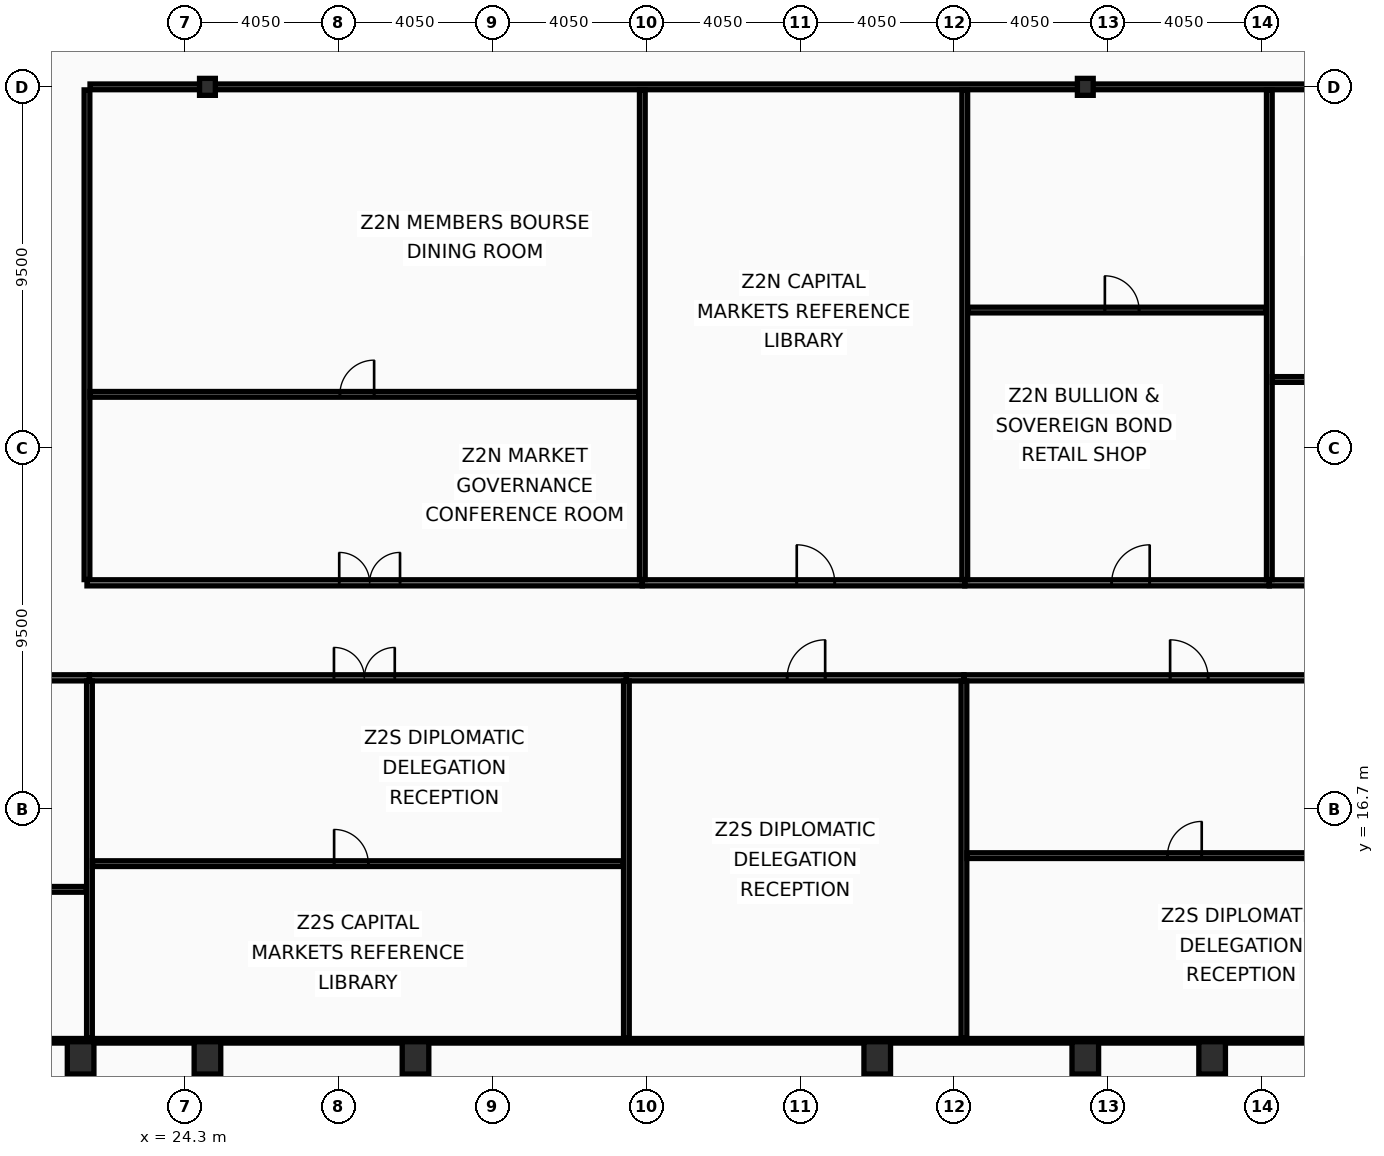
"""IFC4 building model, lengths in metres.
Left out: names, types, materials, properties, quantities, classifications, styles, units other than length and angle.
Written with IfcOpenShell. Run it as: python <this file> out.ifc"""

import sys

from ifc_helpers import new_model, si_unit, direction, frame, frame_2d, origin, origin_2d, place, context, subcontext, project, spatial, rectangle, hollow_rectangle, i_section, extrude, element, fill, save


model = new_model("IFC4")
c1 = context("Model", 3, precision=1e-05, world=origin(), true_north=direction((0.0, 1.0)))
c2 = subcontext(c1, "Body", "Model", "MODEL_VIEW")
j1 = project(units=[si_unit("LENGTHUNIT", "METRE"), si_unit("PLANEANGLEUNIT", "RADIAN")], contexts=[c1])
p1 = place(None, origin())
s1 = spatial("IfcSite", under=j1, at=p1, CompositionType="ELEMENT")
p2 = place(p1, origin())
s2 = spatial("IfcBuilding", under=s1, at=p2, CompositionType="ELEMENT")
p3 = place(p2, frame((0.0, 0.0, 121.8)))
s3 = spatial("IfcBuildingStorey", under=s2, at=p3, CompositionType="ELEMENT", Elevation=121.8)
for number, where, z_axis, x_axis in (
    (1, (21.562, 10.15, 0.0), (0.0, 0.0, 1.0), (1.0, 0.0, 0.0)),
    (2, (24.9, 10.15, 0.0), (0.0, 0.0, 1.0), (1.0, 0.0, 0.0)),
    (3, (30.375, 10.15, 0.0), (0.0, 0.0, 1.0), (1.0, 0.0, 0.0)),
    (4, (42.525, 10.15, 0.0), (0.0, 0.0, 1.0), (1.0, 0.0, 0.0)),
    (5, (48.0, 10.15, 0.0), (0.0, 0.0, 1.0), (1.0, 0.0, 0.0)),
    (6, (51.337, 10.15, 0.0), (0.0, 0.0, 1.0), (1.0, 0.0, 0.0)),
):
    element("IfcColumn", number, at=place(p3, frame(where, z_axis=z_axis, x_axis=x_axis)), inside=s3, PredefinedType="COLUMN", context=c2, shape_type="SweptSolid", body=[
        extrude(hollow_rectangle(XDim=0.7, YDim=0.85, WallThickness=0.05, at=origin_2d()), origin(), (0.0, 0.0, 1.0), 3.6),
    ])
for number, where, z_axis, x_axis in (
    (7, (24.9, 35.7, 0.0), (0.0, 0.0, 1.0), (1.0, 0.0, 0.0)),
    (8, (48.0, 35.7, 0.0), (0.0, 0.0, 1.0), (1.0, 0.0, 0.0)),
):
    element("IfcColumn", number, at=place(p3, frame(where, z_axis=z_axis, x_axis=x_axis)), inside=s3, PredefinedType="COLUMN", context=c2, shape_type="SweptSolid", body=[
        extrude(i_section(OverallWidth=0.416, OverallDepth=0.446, WebThickness=0.039, FlangeThickness=0.063, at=origin_2d()), origin(), (0.0, 0.0, 1.0), 3.6),
    ])
p4 = place(p3, frame((4.03, 20.15, 0.0), z_axis=(0.0, 0.0, 1.0), x_axis=(1.0, 0.0, 0.0)))
e9 = element("IfcWall", 9, at=p4, inside=s3, PredefinedType="PARTITIONING", context=c2, shape_type="SweptSolid", body=[
    extrude(rectangle(XDim=17.765, YDim=0.16, at=frame_2d((8.883, 0.0))), origin(), (0.0, 0.0, 1.0), 2.73),
])
p5 = place(p4, frame((7.961, 0.0, 0.0)))
e10 = element("IfcOpeningElement", 10, at=p5, cuts=e9, PredefinedType="OPENING", context=c2, shape_type="SweptSolid", body=[
    extrude(rectangle(XDim=1.6, YDim=2.15, at=frame_2d((0.8, 1.075))), frame((0.0, 0.09, 0.0), z_axis=(0.0, -1.0, 0.0), x_axis=(1.0, 0.0, 0.0)), (0.0, 0.0, 1.0), 0.18),
])
p6 = place(p3, frame((4.095, 14.584, 0.0), z_axis=(0.0, 0.0, 1.0), x_axis=(1.0, 0.0, 0.0)))
e11 = element("IfcWall", 11, at=p6, inside=s3, PredefinedType="PARTITIONING", context=c2, shape_type="SweptSolid", body=[
    extrude(rectangle(XDim=17.62, YDim=0.15, at=frame_2d((8.81, 0.0))), origin(), (0.0, 0.0, 1.0), 2.73),
])
p7 = place(p6, frame((7.994, 0.0, 0.0)))
e12 = element("IfcOpeningElement", 12, at=p7, cuts=e11, PredefinedType="OPENING", context=c2, shape_type="SweptSolid", body=[
    extrude(rectangle(XDim=0.9, YDim=2.05, at=frame_2d((0.45, 1.025))), frame((0.0, 0.085, 0.0), z_axis=(0.0, -1.0, 0.0), x_axis=(1.0, 0.0, 0.0)), (0.0, 0.0, 1.0), 0.17),
])
p8 = place(p3, frame((21.795, 20.15, 0.0), z_axis=(0.0, 0.0, 1.0), x_axis=(1.0, 0.0, 0.0)))
e13 = element("IfcWall", 13, at=p8, inside=s3, PredefinedType="PARTITIONING", context=c2, shape_type="SweptSolid", body=[
    extrude(rectangle(XDim=14.129, YDim=0.16, at=frame_2d((7.064, 0.0))), origin(), (0.0, 0.0, 1.0), 2.73),
])
p9 = place(p8, frame((6.434, 0.0, 0.0)))
e14 = element("IfcOpeningElement", 14, at=p9, cuts=e13, PredefinedType="OPENING", context=c2, shape_type="SweptSolid", body=[
    extrude(rectangle(XDim=1.6, YDim=2.15, at=frame_2d((0.8, 1.075))), frame((0.0, 0.09, 0.0), z_axis=(0.0, -1.0, 0.0), x_axis=(1.0, 0.0, 0.0)), (0.0, 0.0, 1.0), 0.18),
])
p10 = place(p3, frame((21.795, 10.665, 0.0), z_axis=(0.0, 0.0, 1.0), x_axis=(0.0, 1.0, 0.0)))
e15 = element("IfcWall", 15, at=p10, inside=s3, PredefinedType="PARTITIONING", context=c2, shape_type="SweptSolid", body=[
    extrude(rectangle(XDim=9.4, YDim=0.15, at=frame_2d((4.7, 0.0))), origin(), (0.0, 0.0, 1.0), 2.88),
])
p11 = place(p3, frame((21.875, 15.261, 0.0), z_axis=(0.0, 0.0, 1.0), x_axis=(1.0, 0.0, 0.0)))
e16 = element("IfcWall", 16, at=p11, inside=s3, PredefinedType="PARTITIONING", context=c2, shape_type="SweptSolid", body=[
    extrude(rectangle(XDim=13.969, YDim=0.15, at=frame_2d((6.984, 0.0))), origin(), (0.0, 0.0, 1.0), 2.73),
])
p12 = place(p11, frame((6.358, 0.0, 0.0)))
e17 = element("IfcOpeningElement", 17, at=p12, cuts=e16, PredefinedType="OPENING", context=c2, shape_type="SweptSolid", body=[
    extrude(rectangle(XDim=0.9, YDim=2.05, at=frame_2d((0.45, 1.025))), frame((0.0, 0.085, 0.0), z_axis=(0.0, -1.0, 0.0), x_axis=(1.0, 0.0, 0.0)), (0.0, 0.0, 1.0), 0.17),
])
p13 = place(p3, frame((35.924, 20.15, 0.0), z_axis=(0.0, 0.0, 1.0), x_axis=(1.0, 0.0, 0.0)))
e18 = element("IfcWall", 18, at=p13, inside=s3, PredefinedType="PARTITIONING", context=c2, shape_type="SweptSolid", body=[
    extrude(rectangle(XDim=8.883, YDim=0.16, at=frame_2d((4.441, 0.0))), origin(), (0.0, 0.0, 1.0), 2.73),
])
p14 = place(p13, frame((4.231, 0.0, 0.0)))
e19 = element("IfcOpeningElement", 19, at=p14, cuts=e18, PredefinedType="OPENING", context=c2, shape_type="SweptSolid", body=[
    extrude(rectangle(XDim=1.0, YDim=2.05, at=frame_2d((0.5, 1.025))), frame((0.0, 0.09, 0.0), z_axis=(0.0, -1.0, 0.0), x_axis=(1.0, 0.0, 0.0)), (0.0, 0.0, 1.0), 0.18),
])
p15 = place(p3, frame((35.924, 10.665, 0.0), z_axis=(0.0, 0.0, 1.0), x_axis=(0.0, 1.0, 0.0)))
e20 = element("IfcWall", 20, at=p15, inside=s3, PredefinedType="PARTITIONING", context=c2, shape_type="SweptSolid", body=[
    extrude(rectangle(XDim=9.4, YDim=0.15, at=frame_2d((4.7, 0.0))), origin(), (0.0, 0.0, 1.0), 2.88),
])
p16 = place(p3, frame((44.807, 20.15, 0.0), z_axis=(0.0, 0.0, 1.0), x_axis=(1.0, 0.0, 0.0)))
e21 = element("IfcWall", 21, at=p16, inside=s3, PredefinedType="PARTITIONING", context=c2, shape_type="SweptSolid", body=[
    extrude(rectangle(XDim=11.727, YDim=0.16, at=frame_2d((5.863, 0.0))), origin(), (0.0, 0.0, 1.0), 2.73),
])
p17 = place(p16, frame((5.425, 0.0, 0.0)))
e22 = element("IfcOpeningElement", 22, at=p17, cuts=e21, PredefinedType="OPENING", context=c2, shape_type="SweptSolid", body=[
    extrude(rectangle(XDim=1.0, YDim=2.05, at=frame_2d((0.5, 1.025))), frame((0.0, 0.09, 0.0), z_axis=(0.0, -1.0, 0.0), x_axis=(1.0, 0.0, 0.0)), (0.0, 0.0, 1.0), 0.18),
])
p18 = place(p3, frame((44.807, 10.665, 0.0), z_axis=(0.0, 0.0, 1.0), x_axis=(0.0, 1.0, 0.0)))
e23 = element("IfcWall", 23, at=p18, inside=s3, PredefinedType="PARTITIONING", context=c2, shape_type="SweptSolid", body=[
    extrude(rectangle(XDim=9.4, YDim=0.15, at=frame_2d((4.7, 0.0))), origin(), (0.0, 0.0, 1.0), 2.88),
])
p19 = place(p3, frame((44.887, 15.472, 0.0), z_axis=(0.0, 0.0, 1.0), x_axis=(1.0, 0.0, 0.0)))
e24 = element("IfcWall", 24, at=p19, inside=s3, PredefinedType="PARTITIONING", context=c2, shape_type="SweptSolid", body=[
    extrude(rectangle(XDim=11.566, YDim=0.15, at=frame_2d((5.783, 0.0))), origin(), (0.0, 0.0, 1.0), 2.73),
])
p20 = place(p19, frame((5.277, 0.0, 0.0)))
e25 = element("IfcOpeningElement", 25, at=p20, cuts=e24, PredefinedType="OPENING", context=c2, shape_type="SweptSolid", body=[
    extrude(rectangle(XDim=0.9, YDim=2.05, at=frame_2d((0.45, 1.025))), frame((0.0, 0.085, 0.0), z_axis=(0.0, -1.0, 0.0), x_axis=(1.0, 0.0, 0.0)), (0.0, 0.0, 1.0), 0.17),
])
p21 = place(p3, frame((21.73, 22.735, 0.0), z_axis=(0.0, 0.0, 1.0), x_axis=(0.0, 1.0, 0.0)))
e26 = element("IfcWall", 26, at=p21, inside=s3, PredefinedType="PARTITIONING", context=c2, shape_type="SweptSolid", body=[
    extrude(rectangle(XDim=12.885, YDim=0.15, at=frame_2d((6.442, 0.0))), origin(), (0.0, 0.0, 1.0), 2.88),
])
p22 = place(p3, frame((21.81, 35.7, 0.0), z_axis=(0.0, 0.0, 1.0), x_axis=(1.0, 0.0, 0.0)))
e27 = element("IfcWall", 27, at=p22, inside=s3, PredefinedType="PARTITIONING", context=c2, shape_type="SweptSolid", body=[
    extrude(rectangle(XDim=46.995, YDim=0.15, at=frame_2d((23.498, 0.0))), origin(), (0.0, 0.0, 1.0), 2.73),
])
p23 = place(p3, frame((21.73, 22.65, 0.0), z_axis=(0.0, 0.0, 1.0), x_axis=(1.0, 0.0, 0.0)))
e28 = element("IfcWall", 28, at=p23, inside=s3, PredefinedType="PARTITIONING", context=c2, shape_type="SweptSolid", body=[
    extrude(rectangle(XDim=14.614, YDim=0.16, at=frame_2d((7.307, 0.0))), origin(), (0.0, 0.0, 1.0), 2.73),
])
p24 = place(p23, frame((6.638, 0.0, 0.0)))
e29 = element("IfcOpeningElement", 29, at=p24, cuts=e28, PredefinedType="OPENING", context=c2, shape_type="SweptSolid", body=[
    extrude(rectangle(XDim=1.6, YDim=2.15, at=frame_2d((0.8, 1.075))), frame((0.0, 0.09, 0.0), z_axis=(0.0, -1.0, 0.0), x_axis=(1.0, 0.0, 0.0)), (0.0, 0.0, 1.0), 0.18),
])
p25 = place(p3, frame((21.81, 27.609, 0.0), z_axis=(0.0, 0.0, 1.0), x_axis=(1.0, 0.0, 0.0)))
e30 = element("IfcWall", 30, at=p25, inside=s3, PredefinedType="PARTITIONING", context=c2, shape_type="SweptSolid", body=[
    extrude(rectangle(XDim=14.453, YDim=0.15, at=frame_2d((7.227, 0.0))), origin(), (0.0, 0.0, 1.0), 2.73),
])
p26 = place(p25, frame((6.576, 0.0, 0.0)))
e31 = element("IfcOpeningElement", 31, at=p26, cuts=e30, PredefinedType="OPENING", context=c2, shape_type="SweptSolid", body=[
    extrude(rectangle(XDim=0.9, YDim=2.05, at=frame_2d((0.45, 1.025))), frame((0.0, 0.085, 0.0), z_axis=(0.0, -1.0, 0.0), x_axis=(1.0, 0.0, 0.0)), (0.0, 0.0, 1.0), 0.17),
])
p27 = place(p3, frame((36.344, 22.65, 0.0), z_axis=(0.0, 0.0, 1.0), x_axis=(1.0, 0.0, 0.0)))
e32 = element("IfcWall", 32, at=p27, inside=s3, PredefinedType="PARTITIONING", context=c2, shape_type="SweptSolid", body=[
    extrude(rectangle(XDim=8.485, YDim=0.16, at=frame_2d((4.243, 0.0))), origin(), (0.0, 0.0, 1.0), 2.73),
])
p28 = place(p27, frame((4.064, 0.0, 0.0)))
e33 = element("IfcOpeningElement", 33, at=p28, cuts=e32, PredefinedType="OPENING", context=c2, shape_type="SweptSolid", body=[
    extrude(rectangle(XDim=1.0, YDim=2.05, at=frame_2d((0.5, 1.025))), frame((0.0, 0.09, 0.0), z_axis=(0.0, -1.0, 0.0), x_axis=(1.0, 0.0, 0.0)), (0.0, 0.0, 1.0), 0.18),
])
p29 = place(p3, frame((36.344, 22.735, 0.0), z_axis=(0.0, 0.0, 1.0), x_axis=(0.0, 1.0, 0.0)))
e34 = element("IfcWall", 34, at=p29, inside=s3, PredefinedType="PARTITIONING", context=c2, shape_type="SweptSolid", body=[
    extrude(rectangle(XDim=12.885, YDim=0.15, at=frame_2d((6.442, 0.0))), origin(), (0.0, 0.0, 1.0), 2.88),
])
p30 = place(p3, frame((44.829, 22.65, 0.0), z_axis=(0.0, 0.0, 1.0), x_axis=(1.0, 0.0, 0.0)))
e35 = element("IfcWall", 35, at=p30, inside=s3, PredefinedType="PARTITIONING", context=c2, shape_type="SweptSolid", body=[
    extrude(rectangle(XDim=8.014, YDim=0.16, at=frame_2d((4.007, 0.0))), origin(), (0.0, 0.0, 1.0), 2.73),
])
p31 = place(p30, frame((3.866, 0.0, 0.0)))
e36 = element("IfcOpeningElement", 36, at=p31, cuts=e35, PredefinedType="OPENING", context=c2, shape_type="SweptSolid", body=[
    extrude(rectangle(XDim=1.0, YDim=2.05, at=frame_2d((0.5, 1.025))), frame((0.0, 0.09, 0.0), z_axis=(0.0, -1.0, 0.0), x_axis=(1.0, 0.0, 0.0)), (0.0, 0.0, 1.0), 0.18),
])
p32 = place(p3, frame((44.829, 22.735, 0.0), z_axis=(0.0, 0.0, 1.0), x_axis=(0.0, 1.0, 0.0)))
e37 = element("IfcWall", 37, at=p32, inside=s3, PredefinedType="PARTITIONING", context=c2, shape_type="SweptSolid", body=[
    extrude(rectangle(XDim=12.885, YDim=0.15, at=frame_2d((6.442, 0.0))), origin(), (0.0, 0.0, 1.0), 2.88),
])
p33 = place(p3, frame((44.909, 29.827, 0.0), z_axis=(0.0, 0.0, 1.0), x_axis=(1.0, 0.0, 0.0)))
e38 = element("IfcWall", 38, at=p33, inside=s3, PredefinedType="PARTITIONING", context=c2, shape_type="SweptSolid", body=[
    extrude(rectangle(XDim=7.854, YDim=0.15, at=frame_2d((3.927, 0.0))), origin(), (0.0, 0.0, 1.0), 2.73),
])
p34 = place(p33, frame((3.606, 0.0, 0.0)))
e39 = element("IfcOpeningElement", 39, at=p34, cuts=e38, PredefinedType="OPENING", context=c2, shape_type="SweptSolid", body=[
    extrude(rectangle(XDim=0.9, YDim=2.05, at=frame_2d((0.45, 1.025))), frame((0.0, 0.085, 0.0), z_axis=(0.0, -1.0, 0.0), x_axis=(1.0, 0.0, 0.0)), (0.0, 0.0, 1.0), 0.17),
])
p35 = place(p3, frame((52.842, 22.65, 0.0), z_axis=(0.0, 0.0, 1.0), x_axis=(1.0, 0.0, 0.0)))
e40 = element("IfcWall", 40, at=p35, inside=s3, PredefinedType="PARTITIONING", context=c2, shape_type="SweptSolid", body=[
    extrude(rectangle(XDim=8.485, YDim=0.16, at=frame_2d((4.243, 0.0))), origin(), (0.0, 0.0, 1.0), 2.73),
])
p36 = place(p35, frame((4.064, 0.0, 0.0)))
e41 = element("IfcOpeningElement", 41, at=p36, cuts=e40, PredefinedType="OPENING", context=c2, shape_type="SweptSolid", body=[
    extrude(rectangle(XDim=1.0, YDim=2.05, at=frame_2d((0.5, 1.025))), frame((0.0, 0.09, 0.0), z_axis=(0.0, -1.0, 0.0), x_axis=(1.0, 0.0, 0.0)), (0.0, 0.0, 1.0), 0.18),
])
p37 = place(p3, frame((52.842, 22.735, 0.0), z_axis=(0.0, 0.0, 1.0), x_axis=(0.0, 1.0, 0.0)))
e42 = element("IfcWall", 42, at=p37, inside=s3, PredefinedType="PARTITIONING", context=c2, shape_type="SweptSolid", body=[
    extrude(rectangle(XDim=12.885, YDim=0.15, at=frame_2d((6.442, 0.0))), origin(), (0.0, 0.0, 1.0), 2.88),
])
p38 = place(p3, frame((52.922, 28.0, 0.0), z_axis=(0.0, 0.0, 1.0), x_axis=(1.0, 0.0, 0.0)))
e43 = element("IfcWall", 43, at=p38, inside=s3, PredefinedType="PARTITIONING", context=c2, shape_type="SweptSolid", body=[
    extrude(rectangle(XDim=8.325, YDim=0.15, at=frame_2d((4.163, 0.0))), origin(), (0.0, 0.0, 1.0), 2.73),
])
p39 = place(p38, frame((3.818, 0.0, 0.0)))
e44 = element("IfcOpeningElement", 44, at=p39, cuts=e43, PredefinedType="OPENING", context=c2, shape_type="SweptSolid", body=[
    extrude(rectangle(XDim=0.9, YDim=2.05, at=frame_2d((0.45, 1.025))), frame((0.0, 0.085, 0.0), z_axis=(0.0, -1.0, 0.0), x_axis=(1.0, 0.0, 0.0)), (0.0, 0.0, 1.0), 0.17),
])
p40 = place(p3, frame((4.095, 10.6, 0.0), z_axis=(0.0, 0.0, 1.0), x_axis=(1.0, 0.0, 0.0)))
e45 = element("IfcWall", 45, at=p40, inside=s3, PredefinedType="PARTITIONING", context=c2, shape_type="SweptSolid", body=[
    extrude(rectangle(XDim=64.71, YDim=0.12, at=frame_2d((32.355, 0.0))), origin(), (0.0, 0.0, 1.0), 2.73),
])
p41 = place(p9, origin())
e46 = element("IfcDoor", 46, at=p41, inside=s3, OperationType="DOUBLE_DOOR_SINGLE_SWING", PredefinedType="DOOR", context=c2, shape_type="SweptSolid", body=[
    extrude(rectangle(XDim=1.6, YDim=2.15, at=frame_2d((0.8, 1.075))), frame((0.0, 0.025, 0.0), z_axis=(0.0, -1.0, 0.0), x_axis=(1.0, 0.0, 0.0)), (0.0, 0.0, 1.0), 0.05),
])
fill(e14, e46)
p42 = place(p12, origin())
e47 = element("IfcDoor", 47, at=p42, inside=s3, OperationType="SINGLE_SWING_LEFT", PredefinedType="DOOR", context=c2, shape_type="SweptSolid", body=[
    extrude(rectangle(XDim=0.9, YDim=2.05, at=frame_2d((0.45, 1.025))), frame((0.0, 0.025, 0.0), z_axis=(0.0, -1.0, 0.0), x_axis=(1.0, 0.0, 0.0)), (0.0, 0.0, 1.0), 0.05),
])
fill(e17, e47)
p43 = place(p14, origin())
e48 = element("IfcDoor", 48, at=p43, inside=s3, OperationType="SINGLE_SWING_RIGHT", PredefinedType="DOOR", context=c2, shape_type="SweptSolid", body=[
    extrude(rectangle(XDim=1.0, YDim=2.05, at=frame_2d((0.5, 1.025))), frame((0.0, 0.025, 0.0), z_axis=(0.0, -1.0, 0.0), x_axis=(1.0, 0.0, 0.0)), (0.0, 0.0, 1.0), 0.05),
])
fill(e19, e48)
p44 = place(p17, origin())
e49 = element("IfcDoor", 49, at=p44, inside=s3, OperationType="SINGLE_SWING_LEFT", PredefinedType="DOOR", context=c2, shape_type="SweptSolid", body=[
    extrude(rectangle(XDim=1.0, YDim=2.05, at=frame_2d((0.5, 1.025))), frame((0.0, 0.025, 0.0), z_axis=(0.0, -1.0, 0.0), x_axis=(1.0, 0.0, 0.0)), (0.0, 0.0, 1.0), 0.05),
])
fill(e22, e49)
p45 = place(p20, origin())
e50 = element("IfcDoor", 50, at=p45, inside=s3, OperationType="SINGLE_SWING_RIGHT", PredefinedType="DOOR", context=c2, shape_type="SweptSolid", body=[
    extrude(rectangle(XDim=0.9, YDim=2.05, at=frame_2d((0.45, 1.025))), frame((0.0, 0.025, 0.0), z_axis=(0.0, -1.0, 0.0), x_axis=(1.0, 0.0, 0.0)), (0.0, 0.0, 1.0), 0.05),
])
fill(e25, e50)
p46 = place(p24, origin())
e51 = element("IfcDoor", 51, at=p46, inside=s3, OperationType="DOUBLE_DOOR_SINGLE_SWING", PredefinedType="DOOR", context=c2, shape_type="SweptSolid", body=[
    extrude(rectangle(XDim=1.6, YDim=2.15, at=frame_2d((0.8, 1.075))), frame((0.0, 0.025, 0.0), z_axis=(0.0, -1.0, 0.0), x_axis=(1.0, 0.0, 0.0)), (0.0, 0.0, 1.0), 0.05),
])
fill(e29, e51)
p47 = place(p26, origin())
e52 = element("IfcDoor", 52, at=p47, inside=s3, OperationType="SINGLE_SWING_RIGHT", PredefinedType="DOOR", context=c2, shape_type="SweptSolid", body=[
    extrude(rectangle(XDim=0.9, YDim=2.05, at=frame_2d((0.45, 1.025))), frame((0.0, 0.025, 0.0), z_axis=(0.0, -1.0, 0.0), x_axis=(1.0, 0.0, 0.0)), (0.0, 0.0, 1.0), 0.05),
])
fill(e31, e52)
p48 = place(p28, origin())
e53 = element("IfcDoor", 53, at=p48, inside=s3, OperationType="SINGLE_SWING_LEFT", PredefinedType="DOOR", context=c2, shape_type="SweptSolid", body=[
    extrude(rectangle(XDim=1.0, YDim=2.05, at=frame_2d((0.5, 1.025))), frame((0.0, 0.025, 0.0), z_axis=(0.0, -1.0, 0.0), x_axis=(1.0, 0.0, 0.0)), (0.0, 0.0, 1.0), 0.05),
])
fill(e33, e53)
p49 = place(p31, origin())
e54 = element("IfcDoor", 54, at=p49, inside=s3, OperationType="SINGLE_SWING_RIGHT", PredefinedType="DOOR", context=c2, shape_type="SweptSolid", body=[
    extrude(rectangle(XDim=1.0, YDim=2.05, at=frame_2d((0.5, 1.025))), frame((0.0, 0.025, 0.0), z_axis=(0.0, -1.0, 0.0), x_axis=(1.0, 0.0, 0.0)), (0.0, 0.0, 1.0), 0.05),
])
fill(e36, e54)
p50 = place(p34, origin())
e55 = element("IfcDoor", 55, at=p50, inside=s3, OperationType="SINGLE_SWING_LEFT", PredefinedType="DOOR", context=c2, shape_type="SweptSolid", body=[
    extrude(rectangle(XDim=0.9, YDim=2.05, at=frame_2d((0.45, 1.025))), frame((0.0, 0.025, 0.0), z_axis=(0.0, -1.0, 0.0), x_axis=(1.0, 0.0, 0.0)), (0.0, 0.0, 1.0), 0.05),
])
fill(e39, e55)
save(model, sys.argv[1])
